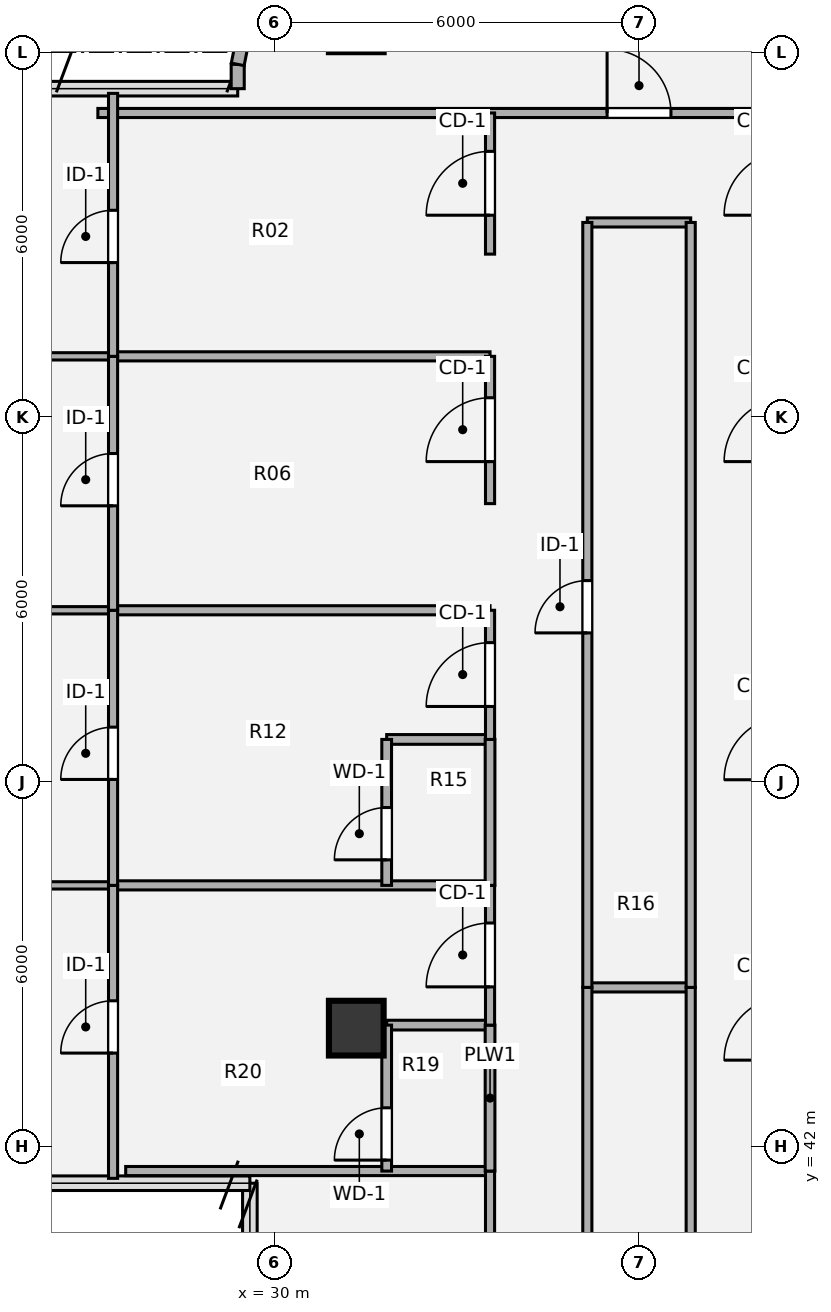
"""IFC4 building model, lengths in metres.
Left out: names, types, materials, properties, quantities, classifications, styles, units other than length and angle.
Written with IfcOpenShell. Run it as: python <this file> out.ifc"""

import sys

from ifc_helpers import new_model, si_unit, direction, frame, frame_2d, origin, origin_2d, place, context, subcontext, project, spatial, rectangle, hollow_circle, extrude, source, transform, mapped, element, fill, save


model = new_model("IFC4")
c1 = context("Model", 3, precision=1e-05, world=origin(), true_north=direction((0.0, 1.0)))
c2 = subcontext(c1, "Body", "Model", "MODEL_VIEW")
j1 = project(units=[si_unit("LENGTHUNIT", "METRE"), si_unit("PLANEANGLEUNIT", "RADIAN")], contexts=[c1])
p1 = place(None, origin())
s1 = spatial("IfcSite", under=j1, at=p1, CompositionType="ELEMENT")
p2 = place(p1, origin())
s2 = spatial("IfcBuilding", under=s1, at=p2, CompositionType="ELEMENT")
p3 = place(p2, frame((0.0, 0.0, 268.38)))
s3 = spatial("IfcBuildingStorey", under=s2, at=p3, CompositionType="ELEMENT", Elevation=268.38)
m1 = source(origin(), c2, "Body", "SweptSolid", [
    extrude(hollow_circle(Radius=0.45, WallThickness=0.032, at=origin_2d()), origin(), (0.0, 0.0, 1.0), 3.78),
])
p4 = place(p3, frame((31.35, 43.95, 0.0), z_axis=(0.0, 0.0, 1.0), x_axis=(1.0, 0.0, 0.0)))
e1 = element("IfcColumn", 1, at=p4, inside=s3, PredefinedType="COLUMN", context=c2, shape_type="MappedRepresentation", body=[
    mapped(m1, transform((0.0, 0.0, 0.0), x_axis=(1.0, 0.0, 0.0), y_axis=(0.0, 1.0, 0.0), z_axis=(0.0, 0.0, 1.0), scale=1.0)),
])
p5 = place(p3, frame((29.4, 59.4, 0.0), z_axis=(0.0, 0.0, 1.0), x_axis=(0.0, 1.0, 0.0)))
e2 = element("IfcWall", 2, at=p5, inside=s3, PredefinedType="SOLIDWALL", context=c2, shape_type="SweptSolid", body=[
    extrude(rectangle(XDim=0.4, YDim=0.215, at=frame_2d((0.2, 0.0))), origin(), (0.0, 0.0, 1.0), 3.53),
])
p6 = place(p3, frame((29.4, 59.8, 0.0), z_axis=(0.0, 0.0, 1.0), x_axis=(0.195190360752, 0.980765376158, 0.0)))
e3 = element("IfcWall", 3, at=p6, inside=s3, PredefinedType="SOLIDWALL", context=c2, shape_type="SweptSolid", body=[
    extrude(rectangle(XDim=1.014, YDim=0.215, at=frame_2d((0.507, 0.0))), origin(), (0.0, 0.0, 1.0), 3.53),
])
p7 = place(p3, frame((27.558, 41.6, 0.0), z_axis=(0.0, 0.0, 1.0), x_axis=(1.0, 0.0, 0.0)))
e4 = element("IfcWall", 4, at=p7, inside=s3, PredefinedType="PARTITIONING", context=c2, shape_type="SweptSolid", body=[
    extrude(rectangle(XDim=5.992, YDim=0.15, at=frame_2d((2.996, 0.0))), origin(), (0.0, 0.0, 1.0), 3.5),
])
p8 = place(p3, frame((31.85, 44.0, 0.0), z_axis=(0.0, 0.0, 1.0), x_axis=(1.0, 0.0, 0.0)))
e5 = element("IfcWall", 5, at=p8, inside=s3, PredefinedType="PLUMBINGWALL", context=c2, shape_type="SweptSolid", body=[
    extrude(rectangle(XDim=1.7, YDim=0.16, at=frame_2d((0.85, 0.0))), origin(), (0.0, 0.0, 1.0), 2.903),
])
p9 = place(p3, frame((35.15, 44.62, 0.0), z_axis=(0.0, 0.0, 1.0), x_axis=(1.0, 0.0, 0.0)))
e6 = element("IfcWall", 6, at=p9, inside=s3, PredefinedType="PARTITIONING", context=c2, shape_type="SweptSolid", body=[
    extrude(rectangle(XDim=1.7, YDim=0.15, at=frame_2d((0.85, 0.0))), origin(), (0.0, 0.0, 1.0), 3.259),
])
p10 = place(p3, frame((17.78, 46.298, 0.0), z_axis=(0.0, 0.0, 1.0), x_axis=(1.0, 0.0, 0.0)))
e7 = element("IfcWall", 7, at=p10, inside=s3, PredefinedType="PARTITIONING", context=c2, shape_type="SweptSolid", body=[
    extrude(rectangle(XDim=9.57, YDim=0.12, at=frame_2d((4.785, 0.0))), origin(), (0.0, 0.0, 1.0), 3.055),
])
p11 = place(p3, frame((27.35, 46.298, 0.0), z_axis=(0.0, 0.0, 1.0), x_axis=(1.0, 0.0, 0.0)))
e8 = element("IfcWall", 8, at=p11, inside=s3, PredefinedType="PARTITIONING", context=c2, shape_type="SweptSolid", body=[
    extrude(rectangle(XDim=6.2, YDim=0.15, at=frame_2d((3.1, 0.0))), origin(), (0.0, 0.0, 1.0), 3.055),
])
p12 = place(p3, frame((31.85, 48.698, 0.0), z_axis=(0.0, 0.0, 1.0), x_axis=(1.0, 0.0, 0.0)))
e9 = element("IfcWall", 9, at=p12, inside=s3, PredefinedType="PLUMBINGWALL", context=c2, shape_type="SweptSolid", body=[
    extrude(rectangle(XDim=1.7, YDim=0.16, at=frame_2d((0.85, 0.0))), origin(), (0.0, 0.0, 1.0), 3.259),
])
p13 = place(p3, frame((17.78, 50.822, 0.0), z_axis=(0.0, 0.0, 1.0), x_axis=(1.0, 0.0, 0.0)))
e10 = element("IfcWall", 10, at=p13, inside=s3, PredefinedType="PARTITIONING", context=c2, shape_type="SweptSolid", body=[
    extrude(rectangle(XDim=9.57, YDim=0.12, at=frame_2d((4.785, 0.0))), origin(), (0.0, 0.0, 1.0), 2.982),
])
p14 = place(p3, frame((27.35, 50.822, 0.0), z_axis=(0.0, 0.0, 1.0), x_axis=(1.0, 0.0, 0.0)))
e11 = element("IfcWall", 11, at=p14, inside=s3, PredefinedType="PARTITIONING", context=c2, shape_type="SweptSolid", body=[
    extrude(rectangle(XDim=6.2, YDim=0.15, at=frame_2d((3.1, 0.0))), origin(), (0.0, 0.0, 1.0), 2.982),
])
p15 = place(p3, frame((17.78, 54.998, 0.0), z_axis=(0.0, 0.0, 1.0), x_axis=(1.0, 0.0, 0.0)))
e12 = element("IfcWall", 12, at=p15, inside=s3, PredefinedType="PARTITIONING", context=c2, shape_type="SweptSolid", body=[
    extrude(rectangle(XDim=9.57, YDim=0.12, at=frame_2d((4.785, 0.0))), origin(), (0.0, 0.0, 1.0), 3.5),
])
p16 = place(p3, frame((27.35, 54.998, 0.0), z_axis=(0.0, 0.0, 1.0), x_axis=(1.0, 0.0, 0.0)))
e13 = element("IfcWall", 13, at=p16, inside=s3, PredefinedType="PARTITIONING", context=c2, shape_type="SweptSolid", body=[
    extrude(rectangle(XDim=6.2, YDim=0.15, at=frame_2d((3.1, 0.0))), origin(), (0.0, 0.0, 1.0), 3.259),
])
p17 = place(p3, frame((35.15, 57.2, 0.0), z_axis=(0.0, 0.0, 1.0), x_axis=(1.0, 0.0, 0.0)))
e14 = element("IfcWall", 14, at=p17, inside=s3, PredefinedType="PARTITIONING", context=c2, shape_type="SweptSolid", body=[
    extrude(rectangle(XDim=1.7, YDim=0.15, at=frame_2d((0.85, 0.0))), origin(), (0.0, 0.0, 1.0), 3.308),
])
p18 = place(p3, frame((27.1, 59.0, 0.0), z_axis=(0.0, 0.0, 1.0), x_axis=(1.0, 0.0, 0.0)))
e15 = element("IfcWall", 15, at=p18, inside=s3, PredefinedType="PARTITIONING", context=c2, shape_type="SweptSolid", body=[
    extrude(rectangle(XDim=17.8, YDim=0.15, at=frame_2d((8.9, 0.0))), origin(), (0.0, 0.0, 1.0), 3.308),
])
p19 = place(p18, frame((8.375, 0.0, 0.0)))
e16 = element("IfcOpeningElement", 16, at=p19, cuts=e15, PredefinedType="OPENING", context=c2, shape_type="SweptSolid", body=[
    extrude(rectangle(XDim=1.05, YDim=2.1, at=origin_2d()), frame((0.525, 0.085, 1.05), z_axis=(0.0, -1.0, 0.0), x_axis=(1.0, 0.0, 0.0)), (0.0, 0.0, 1.0), 0.17),
])
p20 = place(p3, frame((27.35, 41.48, 0.0), z_axis=(0.0, 0.0, 1.0), x_axis=(0.0, 1.0, 0.0)))
e17 = element("IfcWall", 17, at=p20, inside=s3, PredefinedType="PARTITIONING", context=c2, shape_type="SweptSolid", body=[
    extrude(rectangle(XDim=4.818, YDim=0.15, at=frame_2d((2.409, 0.0))), origin(), (0.0, 0.0, 1.0), 3.5),
])
p21 = place(p20, frame((2.06, 0.0, 0.0)))
e18 = element("IfcOpeningElement", 18, at=p21, cuts=e17, PredefinedType="OPENING", context=c2, shape_type="SweptSolid", body=[
    extrude(rectangle(XDim=0.86, YDim=2.1, at=origin_2d()), frame((0.43, 0.085, 1.05), z_axis=(0.0, -1.0, 0.0), x_axis=(1.0, 0.0, 0.0)), (0.0, 0.0, 1.0), 0.17),
])
p22 = place(p3, frame((27.35, 46.298, 0.0), z_axis=(0.0, 0.0, 1.0), x_axis=(0.0, 1.0, 0.0)))
e19 = element("IfcWall", 19, at=p22, inside=s3, PredefinedType="PARTITIONING", context=c2, shape_type="SweptSolid", body=[
    extrude(rectangle(XDim=4.524, YDim=0.15, at=frame_2d((2.262, 0.0))), origin(), (0.0, 0.0, 1.0), 3.5),
])
p23 = place(p22, frame((1.742, 0.0, 0.0)))
e20 = element("IfcOpeningElement", 20, at=p23, cuts=e19, PredefinedType="OPENING", context=c2, shape_type="SweptSolid", body=[
    extrude(rectangle(XDim=0.86, YDim=2.1, at=origin_2d()), frame((0.43, 0.085, 1.05), z_axis=(0.0, -1.0, 0.0), x_axis=(1.0, 0.0, 0.0)), (0.0, 0.0, 1.0), 0.17),
])
p24 = place(p3, frame((27.35, 50.822, 0.0), z_axis=(0.0, 0.0, 1.0), x_axis=(0.0, 1.0, 0.0)))
e21 = element("IfcWall", 21, at=p24, inside=s3, PredefinedType="PARTITIONING", context=c2, shape_type="SweptSolid", body=[
    extrude(rectangle(XDim=4.176, YDim=0.15, at=frame_2d((2.088, 0.0))), origin(), (0.0, 0.0, 1.0), 3.5),
])
p25 = place(p24, frame((1.718, 0.0, 0.0)))
e22 = element("IfcOpeningElement", 22, at=p25, cuts=e21, PredefinedType="OPENING", context=c2, shape_type="SweptSolid", body=[
    extrude(rectangle(XDim=0.86, YDim=2.1, at=origin_2d()), frame((0.43, 0.085, 1.05), z_axis=(0.0, -1.0, 0.0), x_axis=(1.0, 0.0, 0.0)), (0.0, 0.0, 1.0), 0.17),
])
p26 = place(p3, frame((27.35, 54.998, 0.0), z_axis=(0.0, 0.0, 1.0), x_axis=(0.0, 1.0, 0.0)))
e23 = element("IfcWall", 23, at=p26, inside=s3, PredefinedType="PARTITIONING", context=c2, shape_type="SweptSolid", body=[
    extrude(rectangle(XDim=4.324, YDim=0.15, at=frame_2d((2.162, 0.0))), origin(), (0.0, 0.0, 1.0), 3.5),
])
p27 = place(p26, frame((1.542, 0.0, 0.0)))
e24 = element("IfcOpeningElement", 24, at=p27, cuts=e23, PredefinedType="OPENING", context=c2, shape_type="SweptSolid", body=[
    extrude(rectangle(XDim=0.86, YDim=2.1, at=origin_2d()), frame((0.43, 0.085, 1.05), z_axis=(0.0, -1.0, 0.0), x_axis=(1.0, 0.0, 0.0)), (0.0, 0.0, 1.0), 0.17),
])
p28 = place(p3, frame((31.85, 41.6, 0.0), z_axis=(0.0, 0.0, 1.0), x_axis=(0.0, 1.0, 0.0)))
e25 = element("IfcWall", 25, at=p28, inside=s3, PredefinedType="PLUMBINGWALL", context=c2, shape_type="SweptSolid", body=[
    extrude(rectangle(XDim=2.4, YDim=0.16, at=frame_2d((1.2, 0.0))), origin(), (0.0, 0.0, 1.0), 3.5),
])
p29 = place(p28, frame((0.18, 0.0, 0.0)))
e26 = element("IfcOpeningElement", 26, at=p29, cuts=e25, PredefinedType="OPENING", context=c2, shape_type="SweptSolid", body=[
    extrude(rectangle(XDim=0.86, YDim=2.1, at=origin_2d()), frame((0.43, 0.09, 1.05), z_axis=(0.0, -1.0, 0.0), x_axis=(1.0, 0.0, 0.0)), (0.0, 0.0, 1.0), 0.18),
])
p30 = place(p3, frame((31.85, 46.298, 0.0), z_axis=(0.0, 0.0, 1.0), x_axis=(0.0, 1.0, 0.0)))
e27 = element("IfcWall", 27, at=p30, inside=s3, PredefinedType="PLUMBINGWALL", context=c2, shape_type="SweptSolid", body=[
    extrude(rectangle(XDim=2.4, YDim=0.16, at=frame_2d((1.2, 0.0))), origin(), (0.0, 0.0, 1.0), 3.5),
])
p31 = place(p30, frame((0.42, 0.0, 0.0)))
e28 = element("IfcOpeningElement", 28, at=p31, cuts=e27, PredefinedType="OPENING", context=c2, shape_type="SweptSolid", body=[
    extrude(rectangle(XDim=0.86, YDim=2.1, at=origin_2d()), frame((0.43, 0.09, 1.05), z_axis=(0.0, -1.0, 0.0), x_axis=(1.0, 0.0, 0.0)), (0.0, 0.0, 1.0), 0.18),
])
p32 = place(p3, frame((33.55, 21.2, 0.0), z_axis=(0.0, 0.0, 1.0), x_axis=(0.0, 1.0, 0.0)))
e29 = element("IfcWall", 29, at=p32, inside=s3, PredefinedType="PARTITIONING", context=c2, shape_type="SweptSolid", body=[
    extrude(rectangle(XDim=20.4, YDim=0.15, at=frame_2d((10.2, 0.0))), origin(), (0.0, 0.0, 1.0), 3.5),
])
p33 = place(p32, frame((9.64, 0.0, 0.0)))
e30 = element("IfcOpeningElement", 30, at=p33, cuts=e29, PredefinedType="OPENING", context=c2, shape_type="SweptSolid", body=[
    extrude(rectangle(XDim=0.86, YDim=2.1, at=origin_2d()), frame((0.43, 0.085, 1.05), z_axis=(0.0, -1.0, 0.0), x_axis=(1.0, 0.0, 0.0)), (0.0, 0.0, 1.0), 0.17),
])
p34 = place(p3, frame((33.55, 41.6, 0.0), z_axis=(0.0, 0.0, 1.0), x_axis=(0.0, 1.0, 0.0)))
e31 = element("IfcWall", 31, at=p34, inside=s3, PredefinedType="PLUMBINGWALL", context=c2, shape_type="SweptSolid", body=[
    extrude(rectangle(XDim=2.4, YDim=0.16, at=frame_2d((1.2, 0.0))), origin(), (0.0, 0.0, 1.0), 3.5),
])
p35 = place(p3, frame((33.55, 44.0, 0.0), z_axis=(0.0, 0.0, 1.0), x_axis=(0.0, 1.0, 0.0)))
e32 = element("IfcWall", 32, at=p35, inside=s3, PredefinedType="PARTITIONING", context=c2, shape_type="SweptSolid", body=[
    extrude(rectangle(XDim=2.298, YDim=0.15, at=frame_2d((1.149, 0.0))), origin(), (0.0, 0.0, 1.0), 3.5),
])
p36 = place(p35, frame((0.629, 0.0, 0.0)))
e33 = element("IfcOpeningElement", 33, at=p36, cuts=e32, PredefinedType="OPENING", context=c2, shape_type="SweptSolid", body=[
    extrude(rectangle(XDim=1.05, YDim=2.1, at=origin_2d()), frame((0.525, 0.085, 1.05), z_axis=(0.0, -1.0, 0.0), x_axis=(1.0, 0.0, 0.0)), (0.0, 0.0, 1.0), 0.17),
])
p37 = place(p3, frame((33.55, 46.298, 0.0), z_axis=(0.0, 0.0, 1.0), x_axis=(0.0, 1.0, 0.0)))
e34 = element("IfcWall", 34, at=p37, inside=s3, PredefinedType="PLUMBINGWALL", context=c2, shape_type="SweptSolid", body=[
    extrude(rectangle(XDim=2.4, YDim=0.16, at=frame_2d((1.2, 0.0))), origin(), (0.0, 0.0, 1.0), 3.5),
])
p38 = place(p3, frame((33.55, 48.698, 0.0), z_axis=(0.0, 0.0, 1.0), x_axis=(0.0, 1.0, 0.0)))
e35 = element("IfcWall", 35, at=p38, inside=s3, PredefinedType="PARTITIONING", context=c2, shape_type="SweptSolid", body=[
    extrude(rectangle(XDim=2.124, YDim=0.15, at=frame_2d((1.062, 0.0))), origin(), (0.0, 0.0, 1.0), 3.5),
])
p39 = place(p38, frame((0.542, 0.0, 0.0)))
e36 = element("IfcOpeningElement", 36, at=p39, cuts=e35, PredefinedType="OPENING", context=c2, shape_type="SweptSolid", body=[
    extrude(rectangle(XDim=1.05, YDim=2.1, at=origin_2d()), frame((0.525, 0.085, 1.05), z_axis=(0.0, -1.0, 0.0), x_axis=(1.0, 0.0, 0.0)), (0.0, 0.0, 1.0), 0.17),
])
p40 = place(p3, frame((33.55, 52.576, 0.0), z_axis=(0.0, 0.0, 1.0), x_axis=(0.0, 1.0, 0.0)))
e37 = element("IfcWall", 37, at=p40, inside=s3, PredefinedType="PARTITIONING", context=c2, shape_type="SweptSolid", body=[
    extrude(rectangle(XDim=2.422, YDim=0.15, at=frame_2d((1.211, 0.0))), origin(), (0.0, 0.0, 1.0), 3.5),
])
p41 = place(p40, frame((0.691, 0.0, 0.0)))
e38 = element("IfcOpeningElement", 38, at=p41, cuts=e37, PredefinedType="OPENING", context=c2, shape_type="SweptSolid", body=[
    extrude(rectangle(XDim=1.05, YDim=2.1, at=origin_2d()), frame((0.525, 0.085, 1.05), z_axis=(0.0, -1.0, 0.0), x_axis=(1.0, 0.0, 0.0)), (0.0, 0.0, 1.0), 0.17),
])
p42 = place(p3, frame((33.55, 56.679, 0.0), z_axis=(0.0, 0.0, 1.0), x_axis=(0.0, 1.0, 0.0)))
e39 = element("IfcWall", 39, at=p42, inside=s3, PredefinedType="PARTITIONING", context=c2, shape_type="SweptSolid", body=[
    extrude(rectangle(XDim=2.321, YDim=0.15, at=frame_2d((1.161, 0.0))), origin(), (0.0, 0.0, 1.0), 3.5),
])
p43 = place(p42, frame((0.64, 0.0, 0.0)))
e40 = element("IfcOpeningElement", 40, at=p43, cuts=e39, PredefinedType="OPENING", context=c2, shape_type="SweptSolid", body=[
    extrude(rectangle(XDim=1.05, YDim=2.1, at=origin_2d()), frame((0.525, 0.085, 1.05), z_axis=(0.0, -1.0, 0.0), x_axis=(1.0, 0.0, 0.0)), (0.0, 0.0, 1.0), 0.17),
])
p44 = place(p3, frame((35.15, 25.2, 0.0), z_axis=(0.0, 0.0, 1.0), x_axis=(0.0, 1.0, 0.0)))
e41 = element("IfcWall", 41, at=p44, inside=s3, PredefinedType="PARTITIONING", context=c2, shape_type="SweptSolid", body=[
    extrude(rectangle(XDim=19.42, YDim=0.15, at=frame_2d((9.71, 0.0))), origin(), (0.0, 0.0, 1.0), 3.5),
])
p45 = place(p3, frame((35.15, 44.62, 0.0), z_axis=(0.0, 0.0, 1.0), x_axis=(0.0, 1.0, 0.0)))
e42 = element("IfcWall", 42, at=p45, inside=s3, PredefinedType="PARTITIONING", context=c2, shape_type="SweptSolid", body=[
    extrude(rectangle(XDim=12.58, YDim=0.15, at=frame_2d((6.29, 0.0))), origin(), (0.0, 0.0, 1.0), 3.5),
])
p46 = place(p45, frame((5.83, 0.0, 0.0)))
e43 = element("IfcOpeningElement", 43, at=p46, cuts=e42, PredefinedType="OPENING", context=c2, shape_type="SweptSolid", body=[
    extrude(rectangle(XDim=0.86, YDim=2.1, at=origin_2d()), frame((0.43, 0.085, 1.05), z_axis=(0.0, -1.0, 0.0), x_axis=(1.0, 0.0, 0.0)), (0.0, 0.0, 1.0), 0.17),
])
p47 = place(p3, frame((36.85, 25.2, 0.0), z_axis=(0.0, 0.0, 1.0), x_axis=(0.0, 1.0, 0.0)))
e44 = element("IfcWall", 44, at=p47, inside=s3, PredefinedType="PARTITIONING", context=c2, shape_type="SweptSolid", body=[
    extrude(rectangle(XDim=19.42, YDim=0.15, at=frame_2d((9.71, 0.0))), origin(), (0.0, 0.0, 1.0), 3.5),
])
p48 = place(p47, frame((9.185, 0.0, 0.0)))
e45 = element("IfcOpeningElement", 45, at=p48, cuts=e44, PredefinedType="OPENING", context=c2, shape_type="SweptSolid", body=[
    extrude(rectangle(XDim=1.05, YDim=2.1, at=origin_2d()), frame((0.525, 0.085, 1.05), z_axis=(0.0, -1.0, 0.0), x_axis=(1.0, 0.0, 0.0)), (0.0, 0.0, 1.0), 0.17),
])
p49 = place(p3, frame((36.85, 44.62, 0.0), z_axis=(0.0, 0.0, 1.0), x_axis=(0.0, 1.0, 0.0)))
e46 = element("IfcWall", 46, at=p49, inside=s3, PredefinedType="PARTITIONING", context=c2, shape_type="SweptSolid", body=[
    extrude(rectangle(XDim=12.58, YDim=0.15, at=frame_2d((6.29, 0.0))), origin(), (0.0, 0.0, 1.0), 3.5),
])
m2 = source(origin(), c2, "Body", "SweptSolid", [
    extrude(rectangle(XDim=1.05, YDim=2.1, at=origin_2d()), frame((0.525, 0.025, 1.05), z_axis=(0.0, -1.0, 0.0), x_axis=(1.0, 0.0, 0.0)), (0.0, 0.0, 1.0), 0.05),
])
p50 = place(p19, origin())
e47 = element("IfcDoor", 47, at=p50, inside=s3, OperationType="SINGLE_SWING_LEFT", PredefinedType="DOOR", context=c2, shape_type="MappedRepresentation", body=[
    mapped(m2, transform((0.0, 0.0, 0.0), x_axis=(1.0, 0.0, 0.0), y_axis=(0.0, 1.0, 0.0), z_axis=(0.0, 0.0, 1.0), scale=1.0)),
])
fill(e16, e47)
m3 = source(origin(), c2, "Body", "SweptSolid", [
    extrude(rectangle(XDim=0.86, YDim=2.1, at=origin_2d()), frame((0.43, 0.025, 1.05), z_axis=(0.0, -1.0, 0.0), x_axis=(1.0, 0.0, 0.0)), (0.0, 0.0, 1.0), 0.05),
])
p51 = place(p21, origin())
e48 = element("IfcDoor", 48, at=p51, inside=s3, OperationType="SINGLE_SWING_LEFT", PredefinedType="DOOR", context=c2, shape_type="MappedRepresentation", body=[
    mapped(m3, transform((0.0, 0.0, 0.0), x_axis=(1.0, 0.0, 0.0), y_axis=(0.0, 1.0, 0.0), z_axis=(0.0, 0.0, 1.0), scale=1.0)),
])
fill(e18, e48)
p52 = place(p23, origin())
e49 = element("IfcDoor", 49, at=p52, inside=s3, OperationType="SINGLE_SWING_LEFT", PredefinedType="DOOR", context=c2, shape_type="MappedRepresentation", body=[
    mapped(m3, transform((0.0, 0.0, 0.0), x_axis=(1.0, 0.0, 0.0), y_axis=(0.0, 1.0, 0.0), z_axis=(0.0, 0.0, 1.0), scale=1.0)),
])
fill(e20, e49)
p53 = place(p25, origin())
e50 = element("IfcDoor", 50, at=p53, inside=s3, OperationType="SINGLE_SWING_LEFT", PredefinedType="DOOR", context=c2, shape_type="MappedRepresentation", body=[
    mapped(m3, transform((0.0, 0.0, 0.0), x_axis=(1.0, 0.0, 0.0), y_axis=(0.0, 1.0, 0.0), z_axis=(0.0, 0.0, 1.0), scale=1.0)),
])
fill(e22, e50)
p54 = place(p27, origin())
e51 = element("IfcDoor", 51, at=p54, inside=s3, OperationType="SINGLE_SWING_LEFT", PredefinedType="DOOR", context=c2, shape_type="MappedRepresentation", body=[
    mapped(m3, transform((0.0, 0.0, 0.0), x_axis=(1.0, 0.0, 0.0), y_axis=(0.0, 1.0, 0.0), z_axis=(0.0, 0.0, 1.0), scale=1.0)),
])
fill(e24, e51)
m4 = source(origin(), c2, "Body", "SweptSolid", [
    extrude(rectangle(XDim=0.86, YDim=2.1, at=origin_2d()), frame((0.43, 0.025, 1.05), z_axis=(0.0, -1.0, 0.0), x_axis=(1.0, 0.0, 0.0)), (0.0, 0.0, 1.0), 0.05),
])
p55 = place(p29, origin())
e52 = element("IfcDoor", 52, at=p55, inside=s3, OperationType="SINGLE_SWING_LEFT", PredefinedType="DOOR", context=c2, shape_type="MappedRepresentation", body=[
    mapped(m4, transform((0.0, 0.0, 0.0), x_axis=(1.0, 0.0, 0.0), y_axis=(0.0, 1.0, 0.0), z_axis=(0.0, 0.0, 1.0), scale=1.0)),
])
fill(e26, e52)
p56 = place(p31, origin())
e53 = element("IfcDoor", 53, at=p56, inside=s3, OperationType="SINGLE_SWING_LEFT", PredefinedType="DOOR", context=c2, shape_type="MappedRepresentation", body=[
    mapped(m4, transform((0.0, 0.0, 0.0), x_axis=(1.0, 0.0, 0.0), y_axis=(0.0, 1.0, 0.0), z_axis=(0.0, 0.0, 1.0), scale=1.0)),
])
fill(e28, e53)
m5 = source(origin(), c2, "Body", "SweptSolid", [
    extrude(rectangle(XDim=1.05, YDim=2.1, at=origin_2d()), frame((0.525, 0.025, 1.05), z_axis=(0.0, -1.0, 0.0), x_axis=(1.0, 0.0, 0.0)), (0.0, 0.0, 1.0), 0.05),
])
p57 = place(p36, origin())
e54 = element("IfcDoor", 54, at=p57, inside=s3, OperationType="SINGLE_SWING_LEFT", PredefinedType="DOOR", context=c2, shape_type="MappedRepresentation", body=[
    mapped(m5, transform((0.0, 0.0, 0.0), x_axis=(1.0, 0.0, 0.0), y_axis=(0.0, 1.0, 0.0), z_axis=(0.0, 0.0, 1.0), scale=1.0)),
])
fill(e33, e54)
p58 = place(p39, origin())
e55 = element("IfcDoor", 55, at=p58, inside=s3, OperationType="SINGLE_SWING_LEFT", PredefinedType="DOOR", context=c2, shape_type="MappedRepresentation", body=[
    mapped(m5, transform((0.0, 0.0, 0.0), x_axis=(1.0, 0.0, 0.0), y_axis=(0.0, 1.0, 0.0), z_axis=(0.0, 0.0, 1.0), scale=1.0)),
])
fill(e36, e55)
p59 = place(p41, origin())
e56 = element("IfcDoor", 56, at=p59, inside=s3, OperationType="SINGLE_SWING_LEFT", PredefinedType="DOOR", context=c2, shape_type="MappedRepresentation", body=[
    mapped(m5, transform((0.0, 0.0, 0.0), x_axis=(1.0, 0.0, 0.0), y_axis=(0.0, 1.0, 0.0), z_axis=(0.0, 0.0, 1.0), scale=1.0)),
])
fill(e38, e56)
p60 = place(p43, origin())
e57 = element("IfcDoor", 57, at=p60, inside=s3, OperationType="SINGLE_SWING_LEFT", PredefinedType="DOOR", context=c2, shape_type="MappedRepresentation", body=[
    mapped(m5, transform((0.0, 0.0, 0.0), x_axis=(1.0, 0.0, 0.0), y_axis=(0.0, 1.0, 0.0), z_axis=(0.0, 0.0, 1.0), scale=1.0)),
])
fill(e40, e57)
p61 = place(p46, origin())
e58 = element("IfcDoor", 58, at=p61, inside=s3, OperationType="SINGLE_SWING_LEFT", PredefinedType="DOOR", context=c2, shape_type="MappedRepresentation", body=[
    mapped(m3, transform((0.0, 0.0, 0.0), x_axis=(1.0, 0.0, 0.0), y_axis=(0.0, 1.0, 0.0), z_axis=(0.0, 0.0, 1.0), scale=1.0)),
])
fill(e43, e58)
save(model, sys.argv[1])
